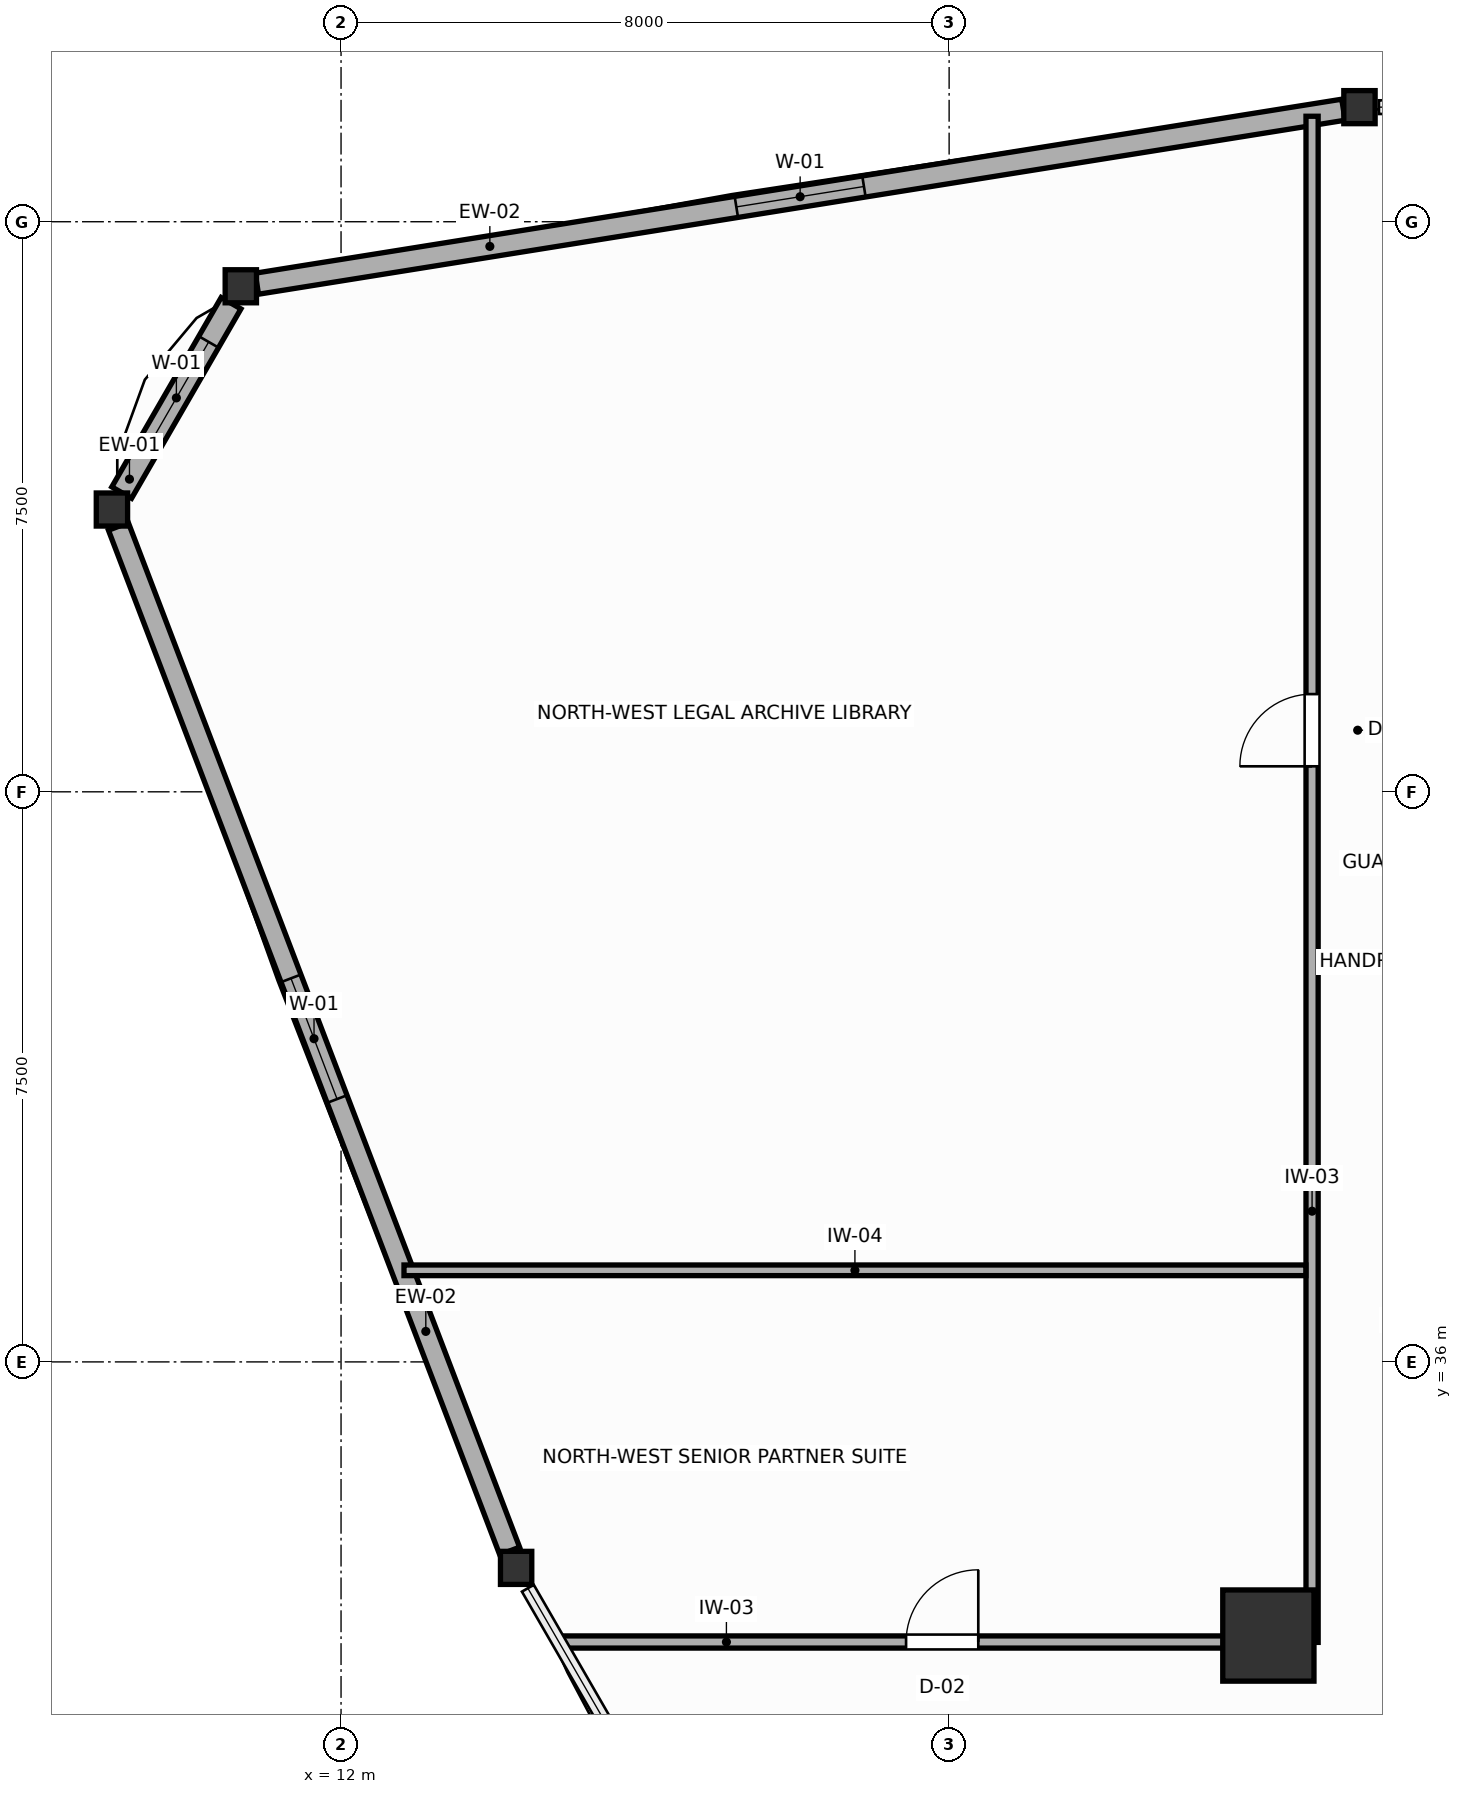
"""IFC4 building model, lengths in metres.
Left out: names, types, materials, properties, quantities, classifications, styles, units other than length and angle.
Written with IfcOpenShell. Run it as: python <this file> out.ifc"""

import sys

from ifc_helpers import new_model, si_unit, direction, frame, frame_2d, origin, origin_2d, place, context, subcontext, project, spatial, rectangle, i_section, extrude, source, transform, mapped, element, fill, save


model = new_model("IFC4")
c1 = context("Model", 3, precision=1e-05, world=origin(), true_north=direction((0.0, 1.0)))
c2 = subcontext(c1, "Body", "Model", "MODEL_VIEW")
j1 = project(units=[si_unit("LENGTHUNIT", "METRE"), si_unit("PLANEANGLEUNIT", "RADIAN")], contexts=[c1])
p1 = place(None, origin())
s1 = spatial("IfcSite", under=j1, at=p1, CompositionType="ELEMENT")
p2 = place(p1, origin())
s2 = spatial("IfcBuilding", under=s1, at=p2, CompositionType="ELEMENT")
p3 = place(p2, frame((0.0, 0.0, 161.4)))
s3 = spatial("IfcBuildingStorey", under=s2, at=p3, CompositionType="ELEMENT", Elevation=161.4)
m1 = source(origin(), c2, "Body", "SweptSolid", [
    extrude(rectangle(XDim=1.2, YDim=1.2, at=origin_2d()), origin(), (0.0, 0.0, 1.0), 3.6),
])
p4 = place(p3, frame((24.2, 32.4, 0.0), z_axis=(0.0, 0.0, 1.0), x_axis=(1.0, 0.0, 0.0)))
e1 = element("IfcColumn", 1, at=p4, inside=s3, PredefinedType="COLUMN", context=c2, shape_type="MappedRepresentation", body=[
    mapped(m1, transform((0.0, 0.0, 0.0), scale=1.0)),
])
m2 = source(origin(), c2, "Body", "SweptSolid", [
    extrude(i_section(OverallWidth=0.412, OverallDepth=0.435, WebThickness=0.033, FlangeThickness=0.053, FilletRadius=0.015, at=origin_2d()), origin(), (0.0, 0.0, 1.0), 3.6),
])
for number, where, z_axis, x_axis in (
    (2, (25.398, 52.508, 0.0), (0.0, 0.0, 1.0), (1.0, 0.0, 0.0)),
    (3, (10.681, 50.151, 0.0), (0.0, 0.0, 1.0), (1.0, 0.0, 0.0)),
    (4, (8.986, 47.214, 0.0), (0.0, 0.0, 1.0), (1.0, 0.0, 0.0)),
    (5, (14.303, 33.29, 0.0), (0.0, 0.0, 1.0), (1.0, 0.0, 0.0)),
):
    element("IfcColumn", number, at=place(p3, frame(where, z_axis=z_axis, x_axis=x_axis)), inside=s3, PredefinedType="COLUMN", context=c2, shape_type="MappedRepresentation", body=[
        mapped(m2, transform((0.0, 0.0, 0.0), scale=1.0)),
    ])
p5 = place(p3, frame((25.188, 52.474, 0.0), z_axis=(0.0, 0.0, 1.0), x_axis=(-0.987423472948, -0.158097707357, 0.0)))
e6 = element("IfcWall", 6, at=p5, inside=s3, PredefinedType="SOLIDWALL", context=c2, shape_type="SweptSolid", body=[
    extrude(rectangle(XDim=14.477, YDim=0.28, at=frame_2d((7.239, 0.0))), origin(), (0.0, 0.0, 1.0), 2.95),
])
p6 = place(p5, frame((6.389, 0.0, 0.75)))
e7 = element("IfcOpeningElement", 7, at=p6, cuts=e6, PredefinedType="OPENING", context=c2, shape_type="SweptSolid", body=[
    extrude(rectangle(XDim=1.7, YDim=1.75, at=frame_2d((0.85, 0.875))), frame((0.0, 0.15, 0.0), z_axis=(0.0, -1.0, 0.0), x_axis=(1.0, 0.0, 0.0)), (0.0, 0.0, 1.0), 0.3),
])
p7 = place(p3, frame((10.553, 49.928, 0.0), z_axis=(0.0, 0.0, 1.0), x_axis=(-0.499962359318, -0.866047134552, 0.0)))
e8 = element("IfcWall", 8, at=p7, inside=s3, PredefinedType="SOLIDWALL", context=c2, shape_type="SweptSolid", body=[
    extrude(rectangle(XDim=2.878, YDim=0.3, at=frame_2d((1.439, 0.0))), origin(), (0.0, 0.0, 1.0), 3.0),
])
p8 = place(p7, frame((0.589, 0.0, 0.75)))
e9 = element("IfcOpeningElement", 9, at=p8, cuts=e8, PredefinedType="OPENING", context=c2, shape_type="SweptSolid", body=[
    extrude(rectangle(XDim=1.7, YDim=1.75, at=frame_2d((0.85, 0.875))), frame((0.0, 0.16, 0.0), z_axis=(0.0, -1.0, 0.0), x_axis=(1.0, 0.0, 0.0)), (0.0, 0.0, 1.0), 0.32),
])
p9 = place(p3, frame((9.071, 46.991, 0.0), z_axis=(0.0, 0.0, 1.0), x_axis=(0.356763590825, -0.934194701474, 0.0)))
e10 = element("IfcWall", 10, at=p9, inside=s3, PredefinedType="SOLIDWALL", context=c2, shape_type="SweptSolid", body=[
    extrude(rectangle(XDim=14.428, YDim=0.28, at=frame_2d((7.214, 0.0))), origin(), (0.0, 0.0, 1.0), 2.95),
])
p10 = place(p9, frame((6.364, 0.0, 0.75)))
e11 = element("IfcOpeningElement", 11, at=p10, cuts=e10, PredefinedType="OPENING", context=c2, shape_type="SweptSolid", body=[
    extrude(rectangle(XDim=1.7, YDim=1.75, at=frame_2d((0.85, 0.875))), frame((0.0, 0.15, 0.0), z_axis=(0.0, -1.0, 0.0), x_axis=(1.0, 0.0, 0.0)), (0.0, 0.0, 1.0), 0.3),
])
p11 = place(p3, frame((24.775, 32.31, 0.0), z_axis=(0.0, 0.0, 1.0), x_axis=(0.0, 1.0, 0.0)))
e12 = element("IfcWall", 12, at=p11, inside=s3, PredefinedType="PARTITIONING", context=c2, shape_type="SweptSolid", body=[
    extrude(rectangle(XDim=20.078, YDim=0.16, at=frame_2d((10.039, 0.0))), origin(), (0.0, 0.0, 1.0), 3.4),
])
p12 = place(p11, frame((11.525, 0.0, 0.0)))
e13 = element("IfcOpeningElement", 13, at=p12, cuts=e12, PredefinedType="OPENING", context=c2, shape_type="SweptSolid", body=[
    extrude(rectangle(XDim=0.95, YDim=2.05, at=frame_2d((0.475, 1.025))), frame((0.0, 0.09, 0.0), z_axis=(0.0, -1.0, 0.0), x_axis=(1.0, 0.0, 0.0)), (0.0, 0.0, 1.0), 0.18),
])
p13 = place(p3, frame((14.886, 32.315, 0.0), z_axis=(0.0, 0.0, 1.0), x_axis=(1.0, 0.0, 0.0)))
e14 = element("IfcWall", 14, at=p13, inside=s3, PredefinedType="PARTITIONING", context=c2, shape_type="SweptSolid", body=[
    extrude(rectangle(XDim=9.807, YDim=0.16, at=frame_2d((4.903, 0.0))), origin(), (0.0, 0.0, 1.0), 2.95),
])
p14 = place(p13, frame((4.547, 0.0, 0.0)))
e15 = element("IfcOpeningElement", 15, at=p14, cuts=e14, PredefinedType="OPENING", context=c2, shape_type="SweptSolid", body=[
    extrude(rectangle(XDim=0.95, YDim=2.05, at=frame_2d((0.475, 1.025))), frame((0.0, 0.09, 0.0), z_axis=(0.0, -1.0, 0.0), x_axis=(1.0, 0.0, 0.0)), (0.0, 0.0, 1.0), 0.18),
])
p15 = place(p3, frame((12.828, 37.205, 0.0), z_axis=(0.0, 0.0, 1.0), x_axis=(1.0, 0.0, 0.0)))
e16 = element("IfcWall", 16, at=p15, inside=s3, PredefinedType="PARTITIONING", context=c2, shape_type="SweptSolid", body=[
    extrude(rectangle(XDim=11.865, YDim=0.14, at=frame_2d((5.933, 0.0))), origin(), (0.0, 0.0, 1.0), 3.4),
])
p16 = place(p6, origin())
e17 = element("IfcWindow", 17, at=p16, inside=s3, PartitioningType="SINGLE_PANEL", PredefinedType="WINDOW", context=c2, shape_type="SweptSolid", body=[
    extrude(rectangle(XDim=1.7, YDim=1.75, at=frame_2d((0.85, 0.875))), frame((0.0, 0.03, 0.0), z_axis=(0.0, -1.0, 0.0), x_axis=(1.0, 0.0, 0.0)), (0.0, 0.0, 1.0), 0.06),
])
fill(e7, e17)
p17 = place(p8, origin())
e18 = element("IfcWindow", 18, at=p17, inside=s3, PartitioningType="SINGLE_PANEL", PredefinedType="WINDOW", context=c2, shape_type="SweptSolid", body=[
    extrude(rectangle(XDim=1.7, YDim=1.75, at=frame_2d((0.85, 0.875))), frame((0.0, 0.03, 0.0), z_axis=(0.0, -1.0, 0.0), x_axis=(1.0, 0.0, 0.0)), (0.0, 0.0, 1.0), 0.06),
])
fill(e9, e18)
p18 = place(p10, origin())
e19 = element("IfcWindow", 19, at=p18, inside=s3, PartitioningType="SINGLE_PANEL", PredefinedType="WINDOW", context=c2, shape_type="SweptSolid", body=[
    extrude(rectangle(XDim=1.7, YDim=1.75, at=frame_2d((0.85, 0.875))), frame((0.0, 0.03, 0.0), z_axis=(0.0, -1.0, 0.0), x_axis=(1.0, 0.0, 0.0)), (0.0, 0.0, 1.0), 0.06),
])
fill(e11, e19)
p19 = place(p12, origin())
e20 = element("IfcDoor", 20, at=p19, inside=s3, OperationType="SINGLE_SWING_LEFT", PredefinedType="DOOR", context=c2, shape_type="SweptSolid", body=[
    extrude(rectangle(XDim=0.95, YDim=2.05, at=frame_2d((0.475, 1.025))), frame((0.0, 0.025, 0.0), z_axis=(0.0, -1.0, 0.0), x_axis=(1.0, 0.0, 0.0)), (0.0, 0.0, 1.0), 0.05),
])
fill(e13, e20)
p20 = place(p14, origin())
e21 = element("IfcDoor", 21, at=p20, inside=s3, OperationType="SINGLE_SWING_RIGHT", PredefinedType="DOOR", context=c2, shape_type="SweptSolid", body=[
    extrude(rectangle(XDim=0.95, YDim=2.05, at=frame_2d((0.475, 1.025))), frame((0.0, 0.025, 0.0), z_axis=(0.0, -1.0, 0.0), x_axis=(1.0, 0.0, 0.0)), (0.0, 0.0, 1.0), 0.05),
])
fill(e15, e21)
save(model, sys.argv[1])
